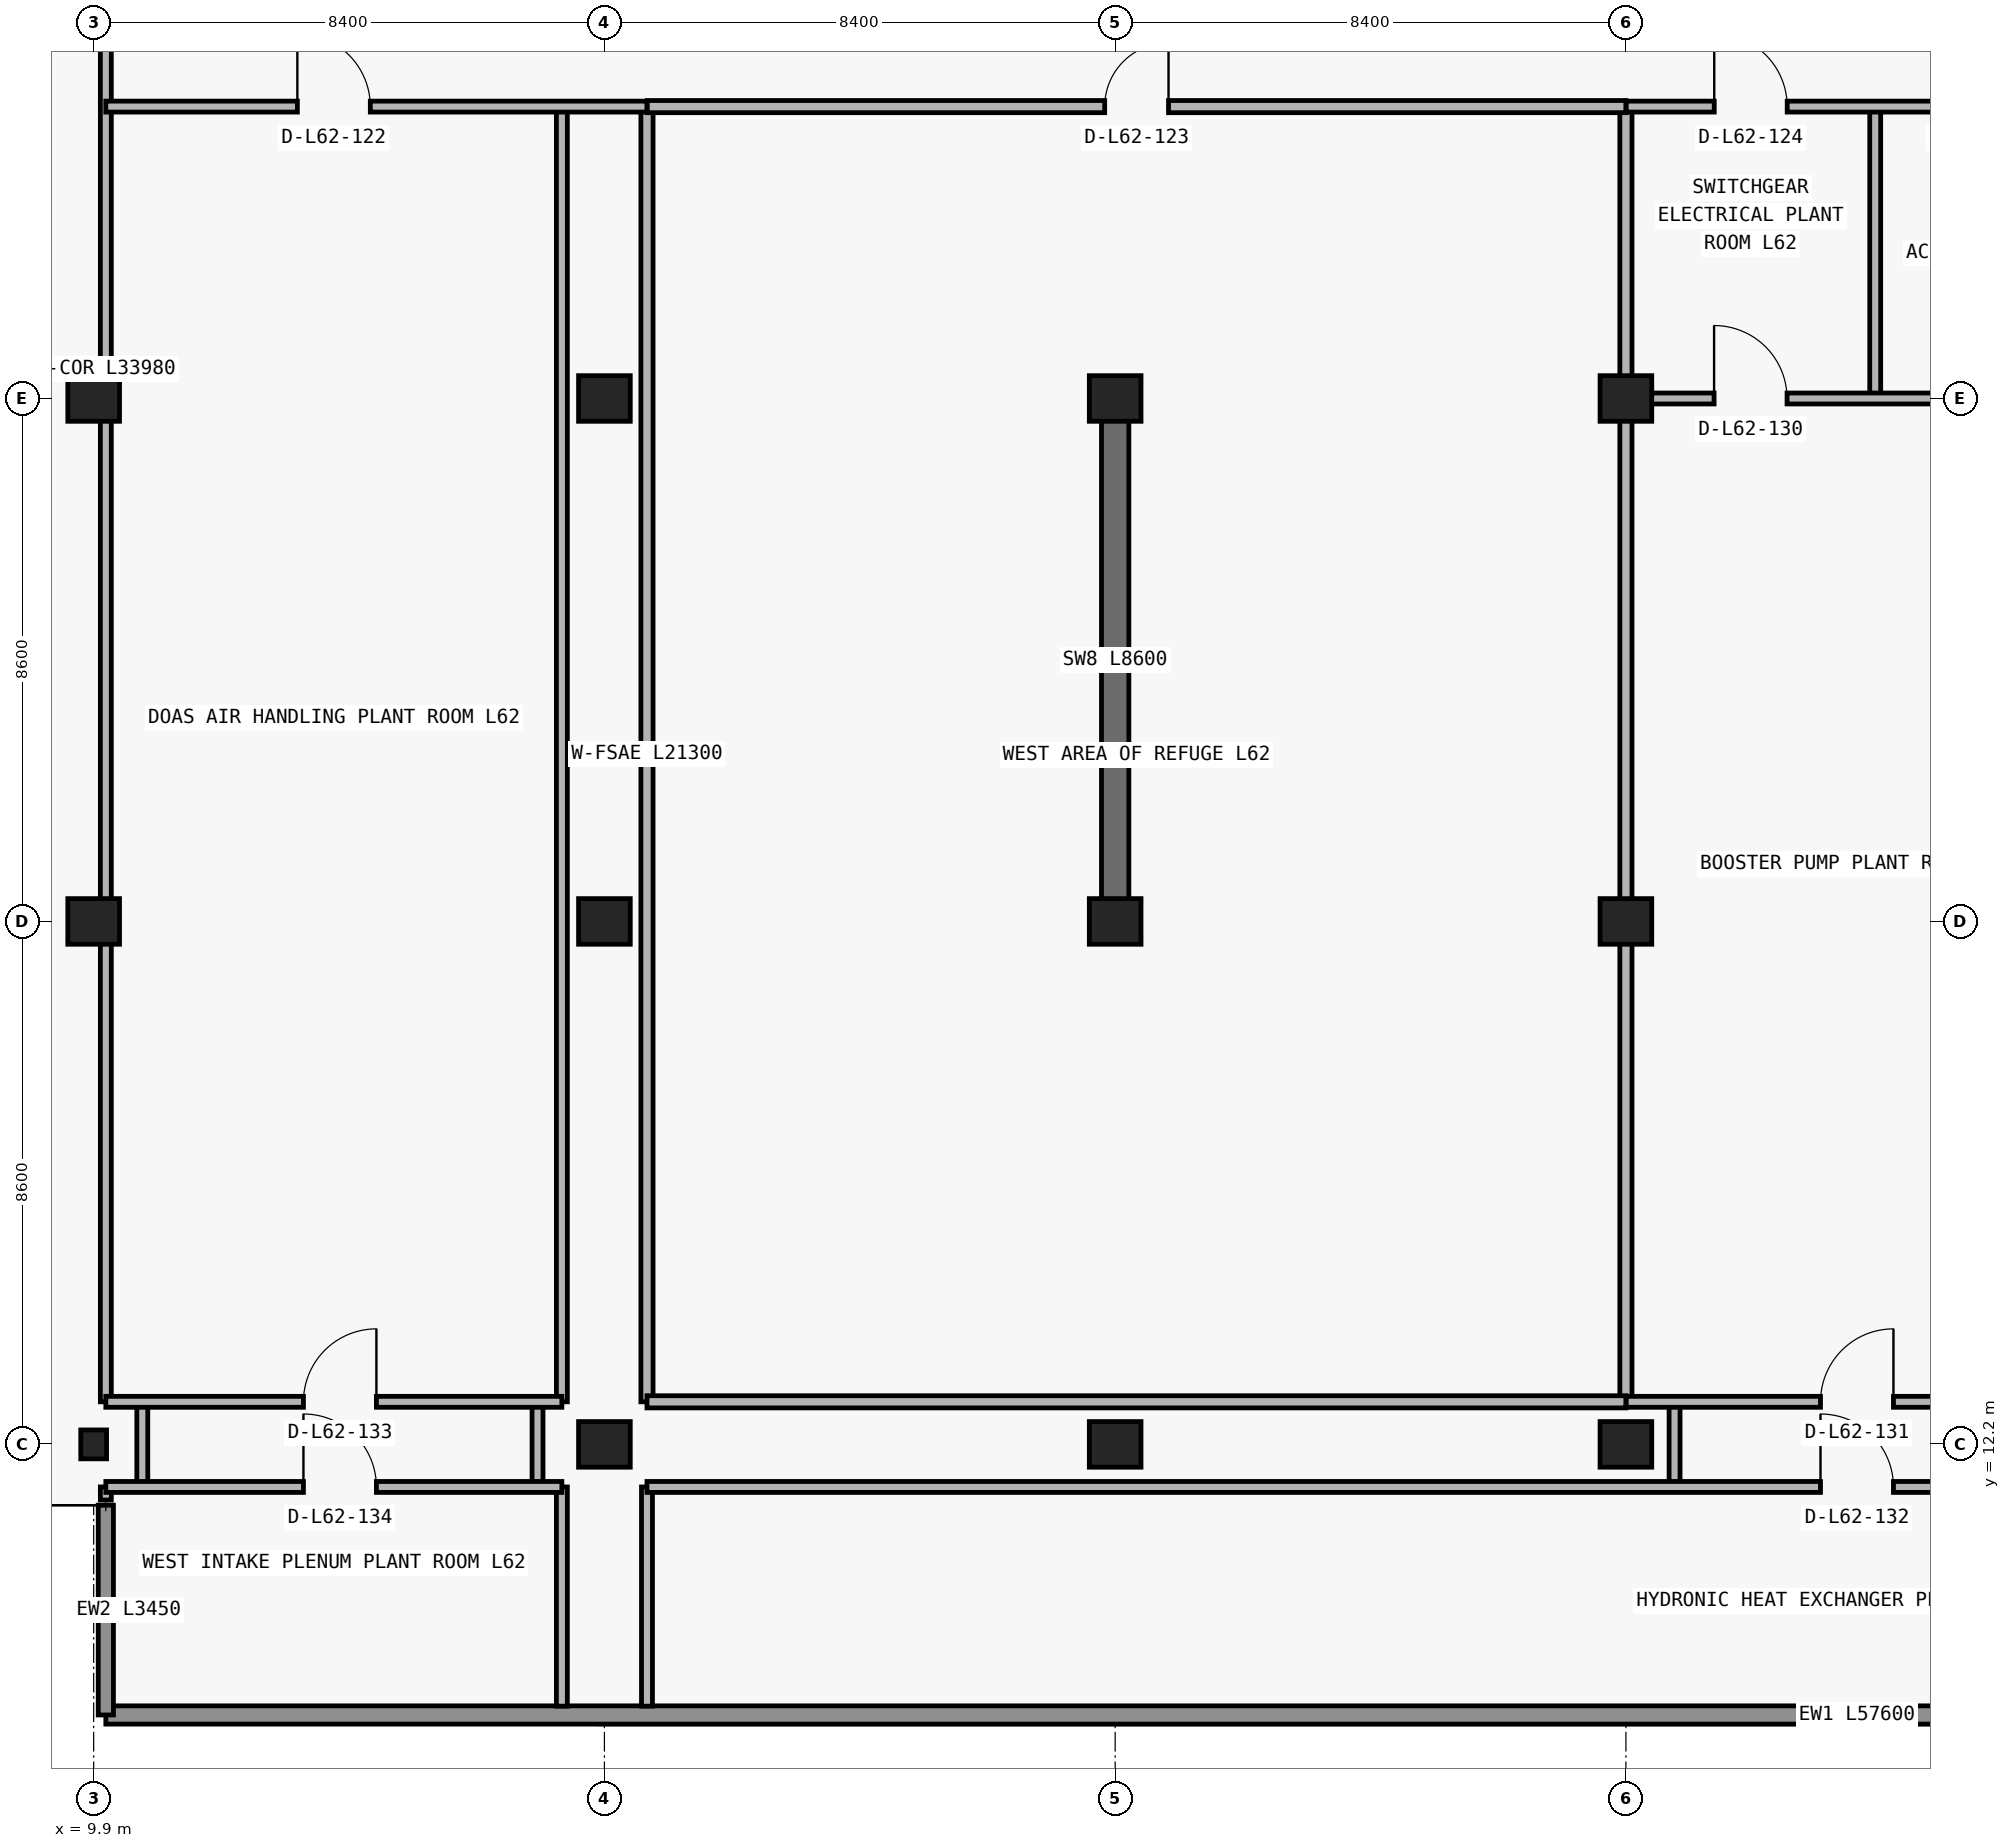
"""IFC4 building model, lengths in metres.
Left out: names, types, materials, properties, quantities, classifications, styles, units other than length and angle.
Written with IfcOpenShell. Run it as: python <this file> out.ifc"""

import sys

from ifc_helpers import new_model, si_unit, direction, frame, frame_2d, origin, origin_2d, place, context, subcontext, project, spatial, rectangle, i_section, extrude, element, fill, save


model = new_model("IFC4")
c1 = context("Model", 3, precision=1e-05, world=origin(), true_north=direction((0.0, 1.0)))
c2 = subcontext(c1, "Body", "Model", "MODEL_VIEW")
j1 = project(units=[si_unit("LENGTHUNIT", "METRE"), si_unit("PLANEANGLEUNIT", "RADIAN")], contexts=[c1])
p1 = place(None, origin())
s1 = spatial("IfcSite", under=j1, at=p1, CompositionType="ELEMENT")
p2 = place(p1, origin())
s2 = spatial("IfcBuilding", under=s1, at=p2, CompositionType="ELEMENT")
p3 = place(p2, frame((0.0, 0.0, 221.4)))
s3 = spatial("IfcBuildingStorey", under=s2, at=p3, CompositionType="ELEMENT", Elevation=221.4)
p4 = place(p3, frame((9.9, 12.2, 0.0), z_axis=(0.0, 0.0, 1.0), x_axis=(1.0, 0.0, 0.0)))
e1 = element("IfcColumn", 1, at=p4, inside=s3, PredefinedType="COLUMN", context=c2, shape_type="SweptSolid", body=[
    extrude(i_section(OverallWidth=0.424, OverallDepth=0.475, WebThickness=0.048, FlangeThickness=0.077, FilletRadius=0.015, at=origin_2d()), origin(), (0.0, 0.0, 1.0), 4.85),
])
for number, where, z_axis, x_axis in (
    (2, (18.3, 12.2, 0.0), (0.0, 0.0, 1.0), (1.0, 0.0, 0.0)),
    (3, (26.7, 12.2, 0.0), (0.0, 0.0, 1.0), (1.0, 0.0, 0.0)),
    (4, (35.1, 12.2, 0.0), (0.0, 0.0, 1.0), (1.0, 0.0, 0.0)),
    (5, (9.9, 20.8, 0.0), (0.0, 0.0, 1.0), (1.0, 0.0, 0.0)),
    (6, (18.3, 20.8, 0.0), (0.0, 0.0, 1.0), (1.0, 0.0, 0.0)),
    (7, (26.7, 20.8, 0.0), (0.0, 0.0, 1.0), (1.0, 0.0, 0.0)),
    (8, (35.1, 20.8, 0.0), (0.0, 0.0, 1.0), (1.0, 0.0, 0.0)),
    (9, (9.9, 29.4, 0.0), (0.0, 0.0, 1.0), (1.0, 0.0, 0.0)),
    (10, (18.3, 29.4, 0.0), (0.0, 0.0, 1.0), (1.0, 0.0, 0.0)),
    (11, (26.7, 29.4, 0.0), (0.0, 0.0, 1.0), (1.0, 0.0, 0.0)),
    (12, (35.1, 29.4, 0.0), (0.0, 0.0, 1.0), (1.0, 0.0, 0.0)),
):
    element("IfcColumn", number, at=place(p3, frame(where, z_axis=z_axis, x_axis=x_axis)), inside=s3, PredefinedType="COLUMN", context=c2, shape_type="SweptSolid", body=[
        extrude(rectangle(XDim=0.85, YDim=0.75, at=origin_2d()), origin(), (0.0, 0.0, 1.0), 4.85),
    ])
p5 = place(p3, frame((26.7, 20.8, 0.0), z_axis=(0.0, 0.0, 1.0), x_axis=(0.0, 1.0, 0.0)))
e13 = element("IfcWall", 13, at=p5, inside=s3, PredefinedType="SHEAR", context=c2, shape_type="SweptSolid", body=[
    extrude(rectangle(XDim=8.6, YDim=0.45, at=frame_2d((4.3, 0.0))), origin(), (0.0, 0.0, 1.0), 4.85),
])
p6 = place(p3, frame((67.7, 7.75, 0.0), z_axis=(0.0, 0.0, 1.0), x_axis=(-1.0, 0.0, 0.0)))
e14 = element("IfcWall", 14, at=p6, inside=s3, PredefinedType="STANDARD", context=c2, shape_type="SweptSolid", body=[
    extrude(rectangle(XDim=57.6, YDim=0.3, at=frame_2d((28.8, 0.0))), origin(), (0.0, 0.0, 1.0), 4.85),
])
p7 = place(p3, frame((10.1, 11.2, 0.0), z_axis=(0.0, 0.0, 1.0), x_axis=(0.0, -1.0, 0.0)))
e15 = element("IfcWall", 15, at=p7, inside=s3, PredefinedType="ELEMENTEDWALL", context=c2, shape_type="SweptSolid", body=[
    extrude(rectangle(XDim=3.45, YDim=0.25, at=frame_2d((1.725, 0.0))), origin(), (0.0, 0.0, 1.0), 4.85),
])
p8 = place(p3, frame((10.1, 11.285, 0.0), z_axis=(0.0, 0.0, 1.0), x_axis=(0.0, 1.0, 0.0)))
e16 = element("IfcWall", 16, at=p8, inside=s3, PredefinedType="PARTITIONING", context=c2, shape_type="SweptSolid", body=[
    extrude(rectangle(XDim=0.215, YDim=0.18, at=frame_2d((0.107, 0.0))), origin(), (0.0, 0.0, 1.0), 4.85),
])
p9 = place(p3, frame((10.1, 12.9, 0.0), z_axis=(0.0, 0.0, 1.0), x_axis=(0.0, 1.0, 0.0)))
e17 = element("IfcWall", 17, at=p9, inside=s3, PredefinedType="PARTITIONING", context=c2, shape_type="SweptSolid", body=[
    extrude(rectangle(XDim=33.98, YDim=0.18, at=frame_2d((16.99, 0.0))), origin(), (0.0, 0.0, 1.0), 3.814),
])
for number, where, z_axis, x_axis in (
    (18, (10.7, 11.5, 0.0), (0.0, 0.0, 1.0), (0.0, 1.0, 0.0)),
    (19, (17.2, 11.5, 0.0), (0.0, 0.0, 1.0), (0.0, 1.0, 0.0)),
):
    element("IfcWall", number, at=place(p3, frame(where, z_axis=z_axis, x_axis=x_axis)), inside=s3, PredefinedType="PARTITIONING", context=c2, shape_type="SweptSolid", body=[
        extrude(rectangle(XDim=1.4, YDim=0.18, at=frame_2d((0.7, 0.0))), origin(), (0.0, 0.0, 1.0), 4.85),
    ])
p10 = place(p3, frame((17.6, 7.895, 0.0), z_axis=(0.0, 0.0, 1.0), x_axis=(0.0, 1.0, 0.0)))
e20 = element("IfcWall", 20, at=p10, inside=s3, PredefinedType="PARTITIONING", context=c2, shape_type="SweptSolid", body=[
    extrude(rectangle(XDim=3.605, YDim=0.18, at=frame_2d((1.802, 0.0))), origin(), (0.0, 0.0, 1.0), 4.85),
])
p11 = place(p3, frame((17.6, 12.9, 0.0), z_axis=(0.0, 0.0, 1.0), x_axis=(0.0, 1.0, 0.0)))
e21 = element("IfcWall", 21, at=p11, inside=s3, PredefinedType="PARTITIONING", context=c2, shape_type="SweptSolid", body=[
    extrude(rectangle(XDim=21.3, YDim=0.18, at=frame_2d((10.65, 0.0))), origin(), (0.0, 0.0, 1.0), 4.85),
])
p12 = place(p3, frame((19.0, 7.895, 0.0), z_axis=(0.0, 0.0, 1.0), x_axis=(0.0, 1.0, 0.0)))
e22 = element("IfcWall", 22, at=p12, inside=s3, PredefinedType="PARTITIONING", context=c2, shape_type="SweptSolid", body=[
    extrude(rectangle(XDim=3.605, YDim=0.18, at=frame_2d((1.802, 0.0))), origin(), (0.0, 0.0, 1.0), 4.85),
])
p13 = place(p3, frame((19.0, 12.9, 0.0), z_axis=(0.0, 0.0, 1.0), x_axis=(0.0, 1.0, 0.0)))
e23 = element("IfcWall", 23, at=p13, inside=s3, PredefinedType="PARTITIONING", context=c2, shape_type="SweptSolid", body=[
    extrude(rectangle(XDim=21.3, YDim=0.2, at=frame_2d((10.65, 0.0))), origin(), (0.0, 0.0, 1.0), 4.85),
])
p14 = place(p3, frame((35.1, 12.9, 0.0), z_axis=(0.0, 0.0, 1.0), x_axis=(0.0, 1.0, 0.0)))
e24 = element("IfcWall", 24, at=p14, inside=s3, PredefinedType="PARTITIONING", context=c2, shape_type="SweptSolid", body=[
    extrude(rectangle(XDim=21.3, YDim=0.2, at=frame_2d((10.65, 0.0))), origin(), (0.0, 0.0, 1.0), 3.814),
])
p15 = place(p3, frame((35.9, 11.5, 0.0), z_axis=(0.0, 0.0, 1.0), x_axis=(0.0, 1.0, 0.0)))
e25 = element("IfcWall", 25, at=p15, inside=s3, PredefinedType="PARTITIONING", context=c2, shape_type="SweptSolid", body=[
    extrude(rectangle(XDim=1.4, YDim=0.18, at=frame_2d((0.7, 0.0))), origin(), (0.0, 0.0, 1.0), 4.85),
])
p16 = place(p3, frame((39.2, 29.4, 0.0), z_axis=(0.0, 0.0, 1.0), x_axis=(0.0, 1.0, 0.0)))
e26 = element("IfcWall", 26, at=p16, inside=s3, PredefinedType="PARTITIONING", context=c2, shape_type="SweptSolid", body=[
    extrude(rectangle(XDim=4.8, YDim=0.18, at=frame_2d((2.4, 0.0))), origin(), (0.0, 0.0, 1.0), 4.85),
])
p17 = place(p3, frame((10.1, 11.5, 0.0), z_axis=(0.0, 0.0, 1.0), x_axis=(1.0, 0.0, 0.0)))
e27 = element("IfcWall", 27, at=p17, inside=s3, PredefinedType="PARTITIONING", context=c2, shape_type="SweptSolid", body=[
    extrude(rectangle(XDim=7.5, YDim=0.18, at=frame_2d((3.75, 0.0))), origin(), (0.0, 0.0, 1.0), 4.85),
])
p18 = place(p17, frame((3.25, 0.0, 0.0)))
e28 = element("IfcOpeningElement", 28, at=p18, cuts=e27, PredefinedType="OPENING", context=c2, shape_type="SweptSolid", body=[
    extrude(rectangle(XDim=1.2, YDim=2.2, at=frame_2d((0.6, 1.1))), frame((0.0, 0.1, 0.0), z_axis=(0.0, -1.0, 0.0), x_axis=(1.0, 0.0, 0.0)), (0.0, 0.0, 1.0), 0.2),
])
p19 = place(p3, frame((19.0, 11.5, 0.0), z_axis=(0.0, 0.0, 1.0), x_axis=(1.0, 0.0, 0.0)))
e29 = element("IfcWall", 29, at=p19, inside=s3, PredefinedType="PARTITIONING", context=c2, shape_type="SweptSolid", body=[
    extrude(rectangle(XDim=39.8, YDim=0.18, at=frame_2d((19.9, 0.0))), origin(), (0.0, 0.0, 1.0), 4.85),
])
p20 = place(p19, frame((19.3, 0.0, 0.0)))
e30 = element("IfcOpeningElement", 30, at=p20, cuts=e29, PredefinedType="OPENING", context=c2, shape_type="SweptSolid", body=[
    extrude(rectangle(XDim=1.2, YDim=2.2, at=frame_2d((0.6, 1.1))), frame((0.0, 0.1, 0.0), z_axis=(0.0, -1.0, 0.0), x_axis=(1.0, 0.0, 0.0)), (0.0, 0.0, 1.0), 0.2),
])
p21 = place(p3, frame((10.1, 12.9, 0.0), z_axis=(0.0, 0.0, 1.0), x_axis=(1.0, 0.0, 0.0)))
e31 = element("IfcWall", 31, at=p21, inside=s3, PredefinedType="PARTITIONING", context=c2, shape_type="SweptSolid", body=[
    extrude(rectangle(XDim=7.5, YDim=0.18, at=frame_2d((3.75, 0.0))), origin(), (0.0, 0.0, 1.0), 4.85),
])
p22 = place(p21, frame((3.25, 0.0, 0.0)))
e32 = element("IfcOpeningElement", 32, at=p22, cuts=e31, PredefinedType="OPENING", context=c2, shape_type="SweptSolid", body=[
    extrude(rectangle(XDim=1.2, YDim=2.2, at=frame_2d((0.6, 1.1))), frame((0.0, 0.1, 0.0), z_axis=(0.0, -1.0, 0.0), x_axis=(1.0, 0.0, 0.0)), (0.0, 0.0, 1.0), 0.2),
])
p23 = place(p3, frame((19.0, 12.9, 0.0), z_axis=(0.0, 0.0, 1.0), x_axis=(1.0, 0.0, 0.0)))
e33 = element("IfcWall", 33, at=p23, inside=s3, PredefinedType="PARTITIONING", context=c2, shape_type="SweptSolid", body=[
    extrude(rectangle(XDim=16.1, YDim=0.2, at=frame_2d((8.05, 0.0))), origin(), (0.0, 0.0, 1.0), 4.85),
])
p24 = place(p3, frame((35.105, 12.9, 0.0), z_axis=(0.0, 0.0, 1.0), x_axis=(1.0, 0.0, 0.0)))
e34 = element("IfcWall", 34, at=p24, inside=s3, PredefinedType="PARTITIONING", context=c2, shape_type="SweptSolid", body=[
    extrude(rectangle(XDim=7.595, YDim=0.18, at=frame_2d((3.797, 0.0))), origin(), (0.0, 0.0, 1.0), 4.85),
])
p25 = place(p24, frame((3.195, 0.0, 0.0)))
e35 = element("IfcOpeningElement", 35, at=p25, cuts=e34, PredefinedType="OPENING", context=c2, shape_type="SweptSolid", body=[
    extrude(rectangle(XDim=1.2, YDim=2.2, at=frame_2d((0.6, 1.1))), frame((0.0, 0.1, 0.0), z_axis=(0.0, -1.0, 0.0), x_axis=(1.0, 0.0, 0.0)), (0.0, 0.0, 1.0), 0.2),
])
p26 = place(p3, frame((35.1, 29.4, 0.0), z_axis=(0.0, 0.0, 1.0), x_axis=(1.0, 0.0, 0.0)))
e36 = element("IfcWall", 36, at=p26, inside=s3, PredefinedType="PARTITIONING", context=c2, shape_type="SweptSolid", body=[
    extrude(rectangle(XDim=7.6, YDim=0.18, at=frame_2d((3.8, 0.0))), origin(), (0.0, 0.0, 1.0), 3.814),
])
p27 = place(p26, frame((1.45, 0.0, 0.0)))
e37 = element("IfcOpeningElement", 37, at=p27, cuts=e36, PredefinedType="OPENING", context=c2, shape_type="SweptSolid", body=[
    extrude(rectangle(XDim=1.2, YDim=2.2, at=frame_2d((0.6, 1.1))), frame((0.0, 0.1, 0.0), z_axis=(0.0, -1.0, 0.0), x_axis=(1.0, 0.0, 0.0)), (0.0, 0.0, 1.0), 0.2),
])
p28 = place(p3, frame((10.1, 34.2, 0.0), z_axis=(0.0, 0.0, 1.0), x_axis=(1.0, 0.0, 0.0)))
e38 = element("IfcWall", 38, at=p28, inside=s3, PredefinedType="PARTITIONING", context=c2, shape_type="SweptSolid", body=[
    extrude(rectangle(XDim=8.9, YDim=0.18, at=frame_2d((4.45, 0.0))), origin(), (0.0, 0.0, 1.0), 4.85),
])
p29 = place(p28, frame((3.15, 0.0, 0.0)))
e39 = element("IfcOpeningElement", 39, at=p29, cuts=e38, PredefinedType="OPENING", context=c2, shape_type="SweptSolid", body=[
    extrude(rectangle(XDim=1.2, YDim=2.2, at=frame_2d((0.6, 1.1))), frame((0.0, 0.1, 0.0), z_axis=(0.0, -1.0, 0.0), x_axis=(1.0, 0.0, 0.0)), (0.0, 0.0, 1.0), 0.2),
])
p30 = place(p3, frame((19.005, 34.2, 0.0), z_axis=(0.0, 0.0, 1.0), x_axis=(1.0, 0.0, 0.0)))
e40 = element("IfcWall", 40, at=p30, inside=s3, PredefinedType="PARTITIONING", context=c2, shape_type="SweptSolid", body=[
    extrude(rectangle(XDim=16.095, YDim=0.2, at=frame_2d((8.048, 0.0))), origin(), (0.0, 0.0, 1.0), 4.85),
])
p31 = place(p30, frame((7.522, 0.0, 0.0)))
e41 = element("IfcOpeningElement", 41, at=p31, cuts=e40, PredefinedType="OPENING", context=c2, shape_type="SweptSolid", body=[
    extrude(rectangle(XDim=1.05, YDim=2.15, at=frame_2d((0.525, 1.075))), frame((0.0, 0.11, 0.0), z_axis=(0.0, -1.0, 0.0), x_axis=(1.0, 0.0, 0.0)), (0.0, 0.0, 1.0), 0.22),
])
p32 = place(p3, frame((35.105, 34.2, 0.0), z_axis=(0.0, 0.0, 1.0), x_axis=(1.0, 0.0, 0.0)))
e42 = element("IfcWall", 42, at=p32, inside=s3, PredefinedType="PARTITIONING", context=c2, shape_type="SweptSolid", body=[
    extrude(rectangle(XDim=7.595, YDim=0.18, at=frame_2d((3.797, 0.0))), origin(), (0.0, 0.0, 1.0), 4.85),
])
p33 = place(p32, frame((1.448, 0.0, 0.0)))
e43 = element("IfcOpeningElement", 43, at=p33, cuts=e42, PredefinedType="OPENING", context=c2, shape_type="SweptSolid", body=[
    extrude(rectangle(XDim=1.2, YDim=2.2, at=frame_2d((0.6, 1.1))), frame((0.0, 0.1, 0.0), z_axis=(0.0, -1.0, 0.0), x_axis=(1.0, 0.0, 0.0)), (0.0, 0.0, 1.0), 0.2),
])
p34 = place(p32, frame((5.42, 0.0, 0.0)))
e44 = element("IfcOpeningElement", 44, at=p34, cuts=e42, PredefinedType="OPENING", context=c2, shape_type="SweptSolid", body=[
    extrude(rectangle(XDim=0.85, YDim=2.1, at=frame_2d((0.425, 1.05))), frame((0.0, 0.1, 0.0), z_axis=(0.0, -1.0, 0.0), x_axis=(1.0, 0.0, 0.0)), (0.0, 0.0, 1.0), 0.2),
])
p35 = place(p29, origin())
e45 = element("IfcDoor", 45, at=p35, inside=s3, OperationType="SINGLE_SWING_LEFT", PredefinedType="DOOR", context=c2, shape_type="SweptSolid", body=[
    extrude(rectangle(XDim=1.2, YDim=2.2, at=frame_2d((0.6, 1.1))), frame((0.0, 0.025, 0.0), z_axis=(0.0, -1.0, 0.0), x_axis=(1.0, 0.0, 0.0)), (0.0, 0.0, 1.0), 0.05),
])
fill(e39, e45)
p36 = place(p31, origin())
e46 = element("IfcDoor", 46, at=p36, inside=s3, OperationType="SINGLE_SWING_RIGHT", PredefinedType="DOOR", context=c2, shape_type="SweptSolid", body=[
    extrude(rectangle(XDim=1.05, YDim=2.15, at=frame_2d((0.525, 1.075))), frame((0.0, 0.025, 0.0), z_axis=(0.0, -1.0, 0.0), x_axis=(1.0, 0.0, 0.0)), (0.0, 0.0, 1.0), 0.05),
])
fill(e41, e46)
p37 = place(p33, origin())
e47 = element("IfcDoor", 47, at=p37, inside=s3, OperationType="SINGLE_SWING_LEFT", PredefinedType="DOOR", context=c2, shape_type="SweptSolid", body=[
    extrude(rectangle(XDim=1.2, YDim=2.2, at=frame_2d((0.6, 1.1))), frame((0.0, 0.025, 0.0), z_axis=(0.0, -1.0, 0.0), x_axis=(1.0, 0.0, 0.0)), (0.0, 0.0, 1.0), 0.05),
])
fill(e43, e47)
p38 = place(p27, origin())
e48 = element("IfcDoor", 48, at=p38, inside=s3, OperationType="SINGLE_SWING_LEFT", PredefinedType="DOOR", context=c2, shape_type="SweptSolid", body=[
    extrude(rectangle(XDim=1.2, YDim=2.2, at=frame_2d((0.6, 1.1))), frame((0.0, 0.025, 0.0), z_axis=(0.0, -1.0, 0.0), x_axis=(1.0, 0.0, 0.0)), (0.0, 0.0, 1.0), 0.05),
])
fill(e37, e48)
p39 = place(p25, origin())
e49 = element("IfcDoor", 49, at=p39, inside=s3, OperationType="SINGLE_SWING_RIGHT", PredefinedType="DOOR", context=c2, shape_type="SweptSolid", body=[
    extrude(rectangle(XDim=1.2, YDim=2.2, at=frame_2d((0.6, 1.1))), frame((0.0, 0.025, 0.0), z_axis=(0.0, -1.0, 0.0), x_axis=(1.0, 0.0, 0.0)), (0.0, 0.0, 1.0), 0.05),
])
fill(e35, e49)
p40 = place(p20, origin())
e50 = element("IfcDoor", 50, at=p40, inside=s3, OperationType="SINGLE_SWING_LEFT", PredefinedType="DOOR", context=c2, shape_type="SweptSolid", body=[
    extrude(rectangle(XDim=1.2, YDim=2.2, at=frame_2d((0.6, 1.1))), frame((0.0, 0.025, 0.0), z_axis=(0.0, -1.0, 0.0), x_axis=(1.0, 0.0, 0.0)), (0.0, 0.0, 1.0), 0.05),
])
fill(e30, e50)
p41 = place(p22, origin())
e51 = element("IfcDoor", 51, at=p41, inside=s3, OperationType="SINGLE_SWING_RIGHT", PredefinedType="DOOR", context=c2, shape_type="SweptSolid", body=[
    extrude(rectangle(XDim=1.2, YDim=2.2, at=frame_2d((0.6, 1.1))), frame((0.0, 0.025, 0.0), z_axis=(0.0, -1.0, 0.0), x_axis=(1.0, 0.0, 0.0)), (0.0, 0.0, 1.0), 0.05),
])
fill(e32, e51)
p42 = place(p18, origin())
e52 = element("IfcDoor", 52, at=p42, inside=s3, OperationType="SINGLE_SWING_LEFT", PredefinedType="DOOR", context=c2, shape_type="SweptSolid", body=[
    extrude(rectangle(XDim=1.2, YDim=2.2, at=frame_2d((0.6, 1.1))), frame((0.0, 0.025, 0.0), z_axis=(0.0, -1.0, 0.0), x_axis=(1.0, 0.0, 0.0)), (0.0, 0.0, 1.0), 0.05),
])
fill(e28, e52)
save(model, sys.argv[1])
